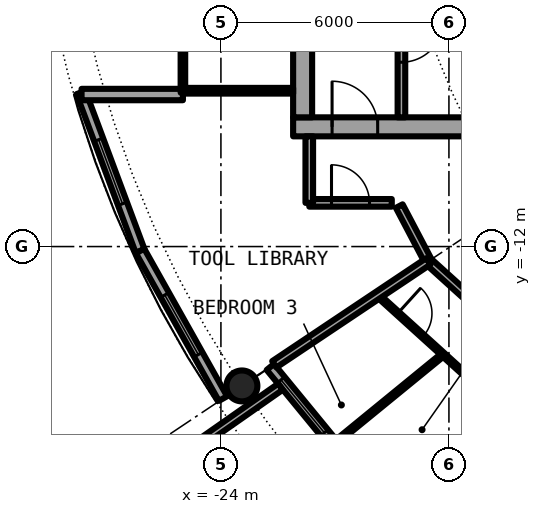
"""IFC4 building model, lengths in metres.
Left out: names, types, materials, properties, quantities, classifications, styles, units other than length and angle.
Written with IfcOpenShell. Run it as: python <this file> out.ifc"""

import sys

from ifc_helpers import new_model, si_unit, direction, frame, frame_2d, origin, origin_2d, place, context, subcontext, project, spatial, rectangle, hollow_circle, extrude, element, fill, save


model = new_model("IFC4")
c1 = context("Model", 3, precision=1e-05, world=origin(), true_north=direction((0.0, 1.0)))
c2 = subcontext(c1, "Body", "Model", "MODEL_VIEW")
j1 = project(units=[si_unit("LENGTHUNIT", "METRE"), si_unit("PLANEANGLEUNIT", "RADIAN")], contexts=[c1])
p1 = place(None, origin())
s1 = spatial("IfcSite", under=j1, at=p1, CompositionType="ELEMENT")
p2 = place(p1, origin())
s2 = spatial("IfcBuilding", under=s1, at=p2, CompositionType="ELEMENT")
p3 = place(p2, frame((0.0, 0.0, 151.3)))
s3 = spatial("IfcBuildingStorey", under=s2, at=p3, CompositionType="ELEMENT", Elevation=151.3)
p4 = place(p3, frame((-23.448, -15.667, 0.0), z_axis=(0.0, 0.0, 1.0), x_axis=(1.0, 0.0, 0.0)))
e1 = element("IfcColumn", 1, at=p4, inside=s3, PredefinedType="COLUMN", context=c2, shape_type="SweptSolid", body=[
    extrude(hollow_circle(Radius=0.406, WallThickness=0.04, at=origin_2d()), origin(), (0.0, 0.0, 1.0), 3.05),
])
p5 = place(p3, frame((-22.699, -15.167, 0.0), z_axis=(0.0, 0.0, 1.0), x_axis=(0.634382322723, -0.773019449054, 0.0)))
e2 = element("IfcWall", 2, at=p5, inside=s3, PredefinedType="SOLIDWALL", context=c2, shape_type="SweptSolid", body=[
    extrude(rectangle(XDim=5.352, YDim=0.25, at=frame_2d((2.676, 0.0))), origin(), (0.0, 0.0, 1.0), 2.7),
])
p6 = place(p5, frame((0.441, 0.0, 0.3)))
e3 = element("IfcOpeningElement", 3, at=p6, cuts=e2, PredefinedType="OPENING", context=c2, shape_type="SweptSolid", body=[
    extrude(rectangle(XDim=1.8, YDim=2.1, at=frame_2d((0.9, 1.05))), frame((0.0, 0.135, 0.0), z_axis=(0.0, -1.0, 0.0), x_axis=(1.0, 0.0, 0.0)), (0.0, 0.0, 1.0), 0.27),
])
p7 = place(p5, frame((3.51, 0.0, 0.0)))
e4 = element("IfcOpeningElement", 4, at=p7, cuts=e2, PredefinedType="OPENING", context=c2, shape_type="SweptSolid", body=[
    extrude(rectangle(XDim=1.0, YDim=2.2, at=frame_2d((0.5, 1.1))), frame((0.0, 0.135, 0.0), z_axis=(0.0, -1.0, 0.0), x_axis=(1.0, 0.0, 0.0)), (0.0, 0.0, 1.0), 0.27),
])
p8 = place(p3, frame((-22.433, -15.688, -0.03), z_axis=(0.0, 0.0, 1.0), x_axis=(-0.819373043115, -0.573260687834, 0.0)))
e5 = element("IfcWall", 5, at=p8, inside=s3, PredefinedType="SOLIDWALL", context=c2, shape_type="SweptSolid", body=[
    extrude(rectangle(XDim=2.925, YDim=0.2, at=frame_2d((1.463, 0.0))), origin(), (0.0, 0.0, 1.0), 2.73),
])
p9 = place(p3, frame((-27.682, -7.945, 0.0), z_axis=(0.0, 0.0, 1.0), x_axis=(0.349247811493, -0.937030397675, 0.0)))
e6 = element("IfcWall", 6, at=p9, inside=s3, PredefinedType="SOLIDWALL", context=c2, shape_type="SweptSolid", body=[
    extrude(rectangle(XDim=4.452, YDim=0.25, at=frame_2d((2.226, 0.0))), origin(), (0.0, 0.0, 1.0), 2.7),
])
p10 = place(p9, frame((1.327, 0.0, 0.3)))
e7 = element("IfcOpeningElement", 7, at=p10, cuts=e6, PredefinedType="OPENING", context=c2, shape_type="SweptSolid", body=[
    extrude(rectangle(XDim=1.8, YDim=2.1, at=frame_2d((0.9, 1.05))), frame((0.0, 0.135, 0.0), z_axis=(0.0, -1.0, 0.0), x_axis=(1.0, 0.0, 0.0)), (0.0, 0.0, 1.0), 0.27),
])
p11 = place(p3, frame((-26.127, -12.117, 0.0), z_axis=(0.0, 0.0, 1.0), x_axis=(0.489696356642, -0.871893042919, 0.0)))
e8 = element("IfcWall", 8, at=p11, inside=s3, PredefinedType="SOLIDWALL", context=c2, shape_type="SweptSolid", body=[
    extrude(rectangle(XDim=4.454, YDim=0.25, at=frame_2d((2.227, 0.0))), origin(), (0.0, 0.0, 1.0), 2.7),
])
p12 = place(p11, frame((1.327, 0.0, 0.3)))
e9 = element("IfcOpeningElement", 9, at=p12, cuts=e8, PredefinedType="OPENING", context=c2, shape_type="SweptSolid", body=[
    extrude(rectangle(XDim=1.8, YDim=2.1, at=frame_2d((0.9, 1.05))), frame((0.0, 0.135, 0.0), z_axis=(0.0, -1.0, 0.0), x_axis=(1.0, 0.0, 0.0)), (0.0, 0.0, 1.0), 0.27),
])
p13 = place(p3, frame((-25.0, -8.0, 0.0), z_axis=(0.0, 0.0, 1.0), x_axis=(-1.0, 0.0, 0.0)))
e10 = element("IfcWall", 10, at=p13, inside=s3, PredefinedType="SOLIDWALL", context=c2, shape_type="SweptSolid", body=[
    extrude(rectangle(XDim=2.667, YDim=0.3, at=frame_2d((1.333, 0.0))), origin(), (0.0, 0.0, 1.0), 2.7),
])
p14 = place(p3, frame((-22.1, -8.85, 0.0), z_axis=(0.0, 0.0, 1.0), x_axis=(1.0, 0.0, 0.0)))
e11 = element("IfcWall", 11, at=p14, inside=s3, PredefinedType="SHEAR", context=c2, shape_type="SweptSolid", body=[
    extrude(rectangle(XDim=13.6, YDim=0.5, at=frame_2d((6.8, 0.0))), origin(), (0.0, 0.0, 1.0), 3.05),
])
p15 = place(p14, frame((1.025, 0.0, 0.0)))
e12 = element("IfcOpeningElement", 12, at=p15, cuts=e11, PredefinedType="OPENING", context=c2, shape_type="SweptSolid", body=[
    extrude(rectangle(XDim=1.2, YDim=2.3, at=frame_2d((0.6, 1.15))), frame((0.0, 0.26, 0.0), z_axis=(0.0, -1.0, 0.0), x_axis=(1.0, 0.0, 0.0)), (0.0, 0.0, 1.0), 0.52),
])
p16 = place(p3, frame((-21.85, -8.6, 0.0), z_axis=(0.0, 0.0, 1.0), x_axis=(0.0, 1.0, 0.0)))
e13 = element("IfcWall", 13, at=p16, inside=s3, PredefinedType="SHEAR", context=c2, shape_type="SweptSolid", body=[
    extrude(rectangle(XDim=17.2, YDim=0.5, at=frame_2d((8.6, 0.0))), origin(), (0.0, 0.0, 1.0), 3.05),
])
p17 = place(p16, frame((7.7, 0.0, 0.0)))
e14 = element("IfcOpeningElement", 14, at=p17, cuts=e13, PredefinedType="OPENING", context=c2, shape_type="SweptSolid", body=[
    extrude(rectangle(XDim=1.8, YDim=2.3, at=frame_2d((0.9, 1.15))), frame((0.0, 0.26, 0.0), z_axis=(0.0, -1.0, 0.0), x_axis=(1.0, 0.0, 0.0)), (0.0, 0.0, 1.0), 0.52),
])
p18 = place(p3, frame((-19.25, -1.575, 0.0), z_axis=(0.0, 0.0, 1.0), x_axis=(0.0, -1.0, 0.0)))
e15 = element("IfcWall", 15, at=p18, inside=s3, PredefinedType="SOLIDWALL", context=c2, shape_type="SweptSolid", body=[
    extrude(rectangle(XDim=7.025, YDim=0.2, at=frame_2d((3.513, 0.0))), origin(), (0.0, 0.0, 1.0), 2.7),
])
p19 = place(p18, frame((4.475, 0.0, 0.0)))
e16 = element("IfcOpeningElement", 16, at=p19, cuts=e15, PredefinedType="OPENING", context=c2, shape_type="SweptSolid", body=[
    extrude(rectangle(XDim=1.1, YDim=2.3, at=frame_2d((0.55, 1.15))), frame((0.0, 0.11, 0.0), z_axis=(0.0, -1.0, 0.0), x_axis=(1.0, 0.0, 0.0)), (0.0, 0.0, 1.0), 0.22),
])
p20 = place(p3, frame((-22.1, -7.9, 0.0), z_axis=(0.0, 0.0, 1.0), x_axis=(-1.0, 0.0, 0.0)))
e17 = element("IfcWall", 17, at=p20, inside=s3, PredefinedType="PARTITIONING", context=c2, shape_type="SweptSolid", body=[
    extrude(rectangle(XDim=2.84, YDim=0.15, at=frame_2d((1.42, 0.0))), origin(), (0.0, 0.0, 1.0), 2.7),
])
p21 = place(p3, frame((-25.0, 7.95, 0.0), z_axis=(0.0, 0.0, 1.0), x_axis=(0.0, -1.0, 0.0)))
e18 = element("IfcWall", 18, at=p21, inside=s3, PredefinedType="PARTITIONING", context=c2, shape_type="SweptSolid", body=[
    extrude(rectangle(XDim=15.9, YDim=0.12, at=frame_2d((7.95, 0.0))), origin(), (0.0, 0.0, 1.0), 2.7),
])
p22 = place(p21, frame((0.95, 0.0, 0.1)))
e19 = element("IfcOpeningElement", 19, at=p22, cuts=e18, PredefinedType="OPENING", context=c2, shape_type="SweptSolid", body=[
    extrude(rectangle(XDim=14.0, YDim=2.35, at=frame_2d((7.0, 1.175))), frame((0.0, 0.07, 0.0), z_axis=(0.0, -1.0, 0.0), x_axis=(1.0, 0.0, 0.0)), (0.0, 0.0, 1.0), 0.14),
])
p23 = place(p3, frame((-19.869, -13.284, 0.0), z_axis=(0.0, 0.0, 1.0), x_axis=(0.741104058203, -0.67139018083, 0.0)))
e20 = element("IfcWall", 20, at=p23, inside=s3, PredefinedType="PARTITIONING", context=c2, shape_type="SweptSolid", body=[
    extrude(rectangle(XDim=6.969, YDim=0.1, at=frame_2d((3.484, 0.0))), origin(), (0.0, 0.0, 1.0), 2.7),
])
p24 = place(p23, frame((3.028, 0.0, 0.0)))
e21 = element("IfcOpeningElement", 21, at=p24, cuts=e20, PredefinedType="OPENING", context=c2, shape_type="SweptSolid", body=[
    extrude(rectangle(XDim=0.9, YDim=2.3, at=frame_2d((0.45, 1.15))), frame((0.0, 0.06, 0.0), z_axis=(0.0, -1.0, 0.0), x_axis=(1.0, 0.0, 0.0)), (0.0, 0.0, 1.0), 0.12),
])
p25 = place(p23, frame((0.705, 0.0, 0.0)))
e22 = element("IfcOpeningElement", 22, at=p25, cuts=e20, PredefinedType="OPENING", context=c2, shape_type="SweptSolid", body=[
    extrude(rectangle(XDim=0.9, YDim=2.3, at=frame_2d((0.45, 1.15))), frame((0.0, 0.06, 0.0), z_axis=(0.0, -1.0, 0.0), x_axis=(1.0, 0.0, 0.0)), (0.0, 0.0, 1.0), 0.12),
])
p26 = place(p3, frame((-19.307, -10.935, 0.0), z_axis=(0.0, 0.0, 1.0), x_axis=(0.465605550524, -0.884992356646, 0.0)))
e23 = element("IfcWall", 23, at=p26, inside=s3, PredefinedType="PARTITIONING", context=c2, shape_type="SweptSolid", body=[
    extrude(rectangle(XDim=1.643, YDim=0.2, at=frame_2d((0.821, 0.0))), origin(), (0.0, 0.0, 1.0), 2.7),
])
p27 = place(p3, frame((-18.542, -12.389, 0.0), z_axis=(0.0, 0.0, 1.0), x_axis=(0.740979597636, -0.671527539188, 0.0)))
e24 = element("IfcWall", 24, at=p27, inside=s3, PredefinedType="PARTITIONING", context=c2, shape_type="SweptSolid", body=[
    extrude(rectangle(XDim=10.841, YDim=0.2, at=frame_2d((5.42, 0.0))), origin(), (0.0, 0.0, 1.0), 2.7),
])
p28 = place(p27, frame((3.835, 0.0, 0.0)))
e25 = element("IfcOpeningElement", 25, at=p28, cuts=e24, PredefinedType="OPENING", context=c2, shape_type="SweptSolid", body=[
    extrude(rectangle(XDim=1.0, YDim=2.3, at=frame_2d((0.5, 1.15))), frame((0.0, 0.11, 0.0), z_axis=(0.0, -1.0, 0.0), x_axis=(1.0, 0.0, 0.0)), (0.0, 0.0, 1.0), 0.22),
])
p29 = place(p3, frame((-21.675, -10.85, 0.0), z_axis=(0.0, 0.0, 1.0), x_axis=(1.0, 0.0, 0.0)))
e26 = element("IfcWall", 26, at=p29, inside=s3, PredefinedType="PARTITIONING", context=c2, shape_type="SweptSolid", body=[
    extrude(rectangle(XDim=2.171, YDim=0.2, at=frame_2d((1.085, 0.0))), origin(), (0.0, 0.0, 1.0), 2.7),
])
p30 = place(p29, frame((0.585, 0.0, 0.0)))
e27 = element("IfcOpeningElement", 27, at=p30, cuts=e26, PredefinedType="OPENING", context=c2, shape_type="SweptSolid", body=[
    extrude(rectangle(XDim=1.0, YDim=2.3, at=frame_2d((0.5, 1.15))), frame((0.0, 0.11, 0.0), z_axis=(0.0, -1.0, 0.0), x_axis=(1.0, 0.0, 0.0)), (0.0, 0.0, 1.0), 0.22),
])
p31 = place(p3, frame((-22.595, -15.098, 0.0), z_axis=(0.0, 0.0, 1.0), x_axis=(0.831387096605, 0.55569370664, 0.0)))
e28 = element("IfcWall", 28, at=p31, inside=s3, PredefinedType="PARTITIONING", context=c2, shape_type="SweptSolid", body=[
    extrude(rectangle(XDim=4.875, YDim=0.2, at=frame_2d((2.438, 0.0))), origin(), (0.0, 0.0, 1.0), 2.7),
])
p32 = place(p3, frame((-21.04, -17.199, 0.0), z_axis=(0.0, 0.0, 1.0), x_axis=(0.774321581607, 0.63279229472, 0.0)))
e29 = element("IfcWall", 29, at=p32, inside=s3, PredefinedType="PARTITIONING", context=c2, shape_type="SweptSolid", body=[
    extrude(rectangle(XDim=3.731, YDim=0.1, at=frame_2d((1.866, 0.0))), origin(), (0.0, 0.0, 1.0), 2.7),
])
p33 = place(p3, frame((-19.231, -19.2, 0.0), z_axis=(0.0, 0.0, 1.0), x_axis=(0.707722727509, 0.706490297858, 0.0)))
e30 = element("IfcWall", 30, at=p33, inside=s3, PredefinedType="PARTITIONING", context=c2, shape_type="SweptSolid", body=[
    extrude(rectangle(XDim=3.962, YDim=0.1, at=frame_2d((1.981, 0.0))), origin(), (0.0, 0.0, 1.0), 2.7),
])
p34 = place(p3, frame((-21.675, -10.85, 0.0), z_axis=(0.0, 0.0, 1.0), x_axis=(0.0, 1.0, 0.0)))
e31 = element("IfcWall", 31, at=p34, inside=s3, PredefinedType="PARTITIONING", context=c2, shape_type="SweptSolid", body=[
    extrude(rectangle(XDim=1.75, YDim=0.2, at=frame_2d((0.875, 0.0))), origin(), (0.0, 0.0, 1.0), 2.7),
])
p35 = place(p6, origin())
e32 = element("IfcWindow", 32, at=p35, inside=s3, PartitioningType="SINGLE_PANEL", PredefinedType="WINDOW", context=c2, shape_type="SweptSolid", body=[
    extrude(rectangle(XDim=1.8, YDim=2.1, at=frame_2d((0.9, 1.05))), frame((0.0, 0.03, 0.0), z_axis=(0.0, -1.0, 0.0), x_axis=(1.0, 0.0, 0.0)), (0.0, 0.0, 1.0), 0.06),
])
fill(e3, e32)
p36 = place(p10, origin())
e33 = element("IfcWindow", 33, at=p36, inside=s3, PartitioningType="SINGLE_PANEL", PredefinedType="WINDOW", context=c2, shape_type="SweptSolid", body=[
    extrude(rectangle(XDim=1.8, YDim=2.1, at=frame_2d((0.9, 1.05))), frame((0.0, 0.03, 0.0), z_axis=(0.0, -1.0, 0.0), x_axis=(1.0, 0.0, 0.0)), (0.0, 0.0, 1.0), 0.06),
])
fill(e7, e33)
p37 = place(p12, origin())
e34 = element("IfcWindow", 34, at=p37, inside=s3, PartitioningType="SINGLE_PANEL", PredefinedType="WINDOW", context=c2, shape_type="SweptSolid", body=[
    extrude(rectangle(XDim=1.8, YDim=2.1, at=frame_2d((0.9, 1.05))), frame((0.0, 0.03, 0.0), z_axis=(0.0, -1.0, 0.0), x_axis=(1.0, 0.0, 0.0)), (0.0, 0.0, 1.0), 0.06),
])
fill(e9, e34)
p38 = place(p19, origin())
e35 = element("IfcDoor", 35, at=p38, inside=s3, OperationType="SINGLE_SWING_LEFT", PredefinedType="DOOR", context=c2, shape_type="SweptSolid", body=[
    extrude(rectangle(XDim=1.1, YDim=2.3, at=frame_2d((0.55, 1.15))), frame((0.0, 0.025, 0.0), z_axis=(0.0, -1.0, 0.0), x_axis=(1.0, 0.0, 0.0)), (0.0, 0.0, 1.0), 0.05),
])
fill(e16, e35)
p39 = place(p15, origin())
e36 = element("IfcDoor", 36, at=p39, inside=s3, OperationType="SINGLE_SWING_RIGHT", PredefinedType="DOOR", context=c2, shape_type="SweptSolid", body=[
    extrude(rectangle(XDim=1.2, YDim=2.3, at=frame_2d((0.6, 1.15))), frame((0.0, 0.025, 0.0), z_axis=(0.0, -1.0, 0.0), x_axis=(1.0, 0.0, 0.0)), (0.0, 0.0, 1.0), 0.05),
])
fill(e12, e36)
p40 = place(p22, origin())
e37 = element("IfcWindow", 37, at=p40, inside=s3, PartitioningType="SINGLE_PANEL", PredefinedType="WINDOW", context=c2, shape_type="SweptSolid", body=[
    extrude(rectangle(XDim=14.0, YDim=2.35, at=frame_2d((7.0, 1.175))), frame((0.0, 0.03, 0.0), z_axis=(0.0, -1.0, 0.0), x_axis=(1.0, 0.0, 0.0)), (0.0, 0.0, 1.0), 0.06),
])
fill(e19, e37)
p41 = place(p25, origin())
e38 = element("IfcDoor", 38, at=p41, inside=s3, OperationType="SINGLE_SWING_LEFT", PredefinedType="DOOR", context=c2, shape_type="SweptSolid", body=[
    extrude(rectangle(XDim=0.9, YDim=2.3, at=frame_2d((0.45, 1.15))), frame((0.0, 0.025, 0.0), z_axis=(0.0, -1.0, 0.0), x_axis=(1.0, 0.0, 0.0)), (0.0, 0.0, 1.0), 0.05),
])
fill(e22, e38)
p42 = place(p30, origin())
e39 = element("IfcDoor", 39, at=p42, inside=s3, OperationType="SINGLE_SWING_LEFT", PredefinedType="DOOR", context=c2, shape_type="SweptSolid", body=[
    extrude(rectangle(XDim=1.0, YDim=2.3, at=frame_2d((0.5, 1.15))), frame((0.0, 0.025, 0.0), z_axis=(0.0, -1.0, 0.0), x_axis=(1.0, 0.0, 0.0)), (0.0, 0.0, 1.0), 0.05),
])
fill(e27, e39)
save(model, sys.argv[1])
